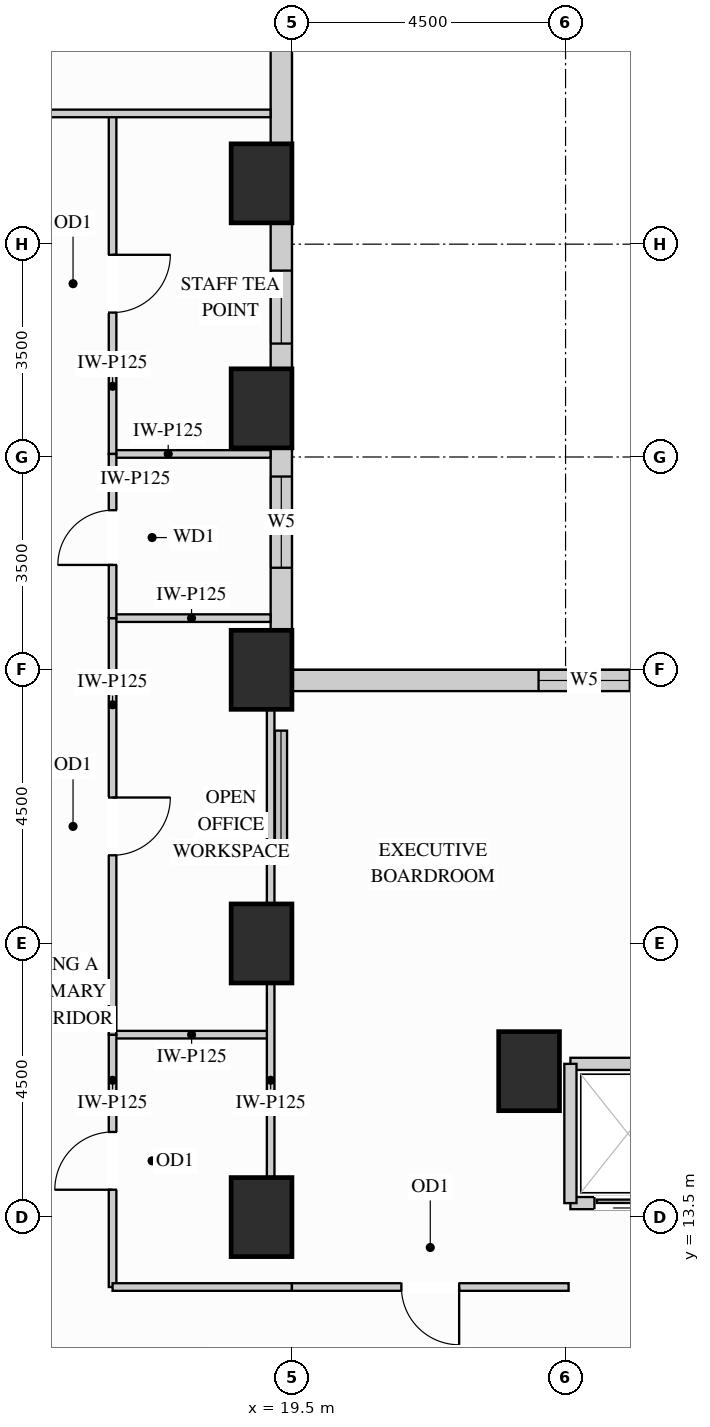
"""IFC4 building model, lengths in metres.
Left out: names, types, materials, properties, quantities, classifications, styles, units other than length and angle.
Written with IfcOpenShell. Run it as: python <this file> out.ifc"""

import sys

from ifc_helpers import new_model, si_unit, direction, frame, frame_2d, origin, origin_2d, place, context, subcontext, project, spatial, rectangle, extrude, source, transform, mapped, element, fill, save


model = new_model("IFC4")
c1 = context("Model", 3, precision=1e-05, world=origin(), true_north=direction((0.0, 1.0)))
c2 = subcontext(c1, "Body", "Model", "MODEL_VIEW")
j1 = project(units=[si_unit("LENGTHUNIT", "METRE"), si_unit("PLANEANGLEUNIT", "RADIAN")], contexts=[c1])
p1 = place(None, origin())
s1 = spatial("IfcSite", under=j1, at=p1, CompositionType="ELEMENT")
p2 = place(p1, origin())
s2 = spatial("IfcBuilding", under=s1, at=p2, CompositionType="ELEMENT")
p3 = place(p2, frame((0.0, 0.0, 65.7)))
s3 = spatial("IfcBuildingStorey", under=s2, at=p3, CompositionType="ELEMENT", Elevation=65.7)
m1 = source(origin(), c2, "Body", "SweptSolid", [
    extrude(rectangle(XDim=1.0, YDim=1.3, at=origin_2d()), origin(), (0.0, 0.0, 1.0), 3.38),
])
for number, where, z_axis, x_axis in (
    (1, (19.0, 13.5, 0.0), (0.0, 0.0, 1.0), (1.0, 0.0, 0.0)),
    (2, (19.0, 18.0, 0.0), (0.0, 0.0, 1.0), (1.0, 0.0, 0.0)),
    (3, (19.0, 22.5, 0.0), (0.0, 0.0, 1.0), (1.0, 0.0, 0.0)),
    (4, (19.0, 26.8, 0.0), (0.0, 0.0, 1.0), (1.0, 0.0, 0.0)),
    (5, (19.0, 30.5, 0.0), (0.0, 0.0, 1.0), (1.0, 0.0, 0.0)),
    (6, (23.4, 15.9, 0.0), (0.0, 0.0, 1.0), (1.0, 0.0, 0.0)),
):
    element("IfcColumn", number, at=place(p3, frame(where, z_axis=z_axis, x_axis=x_axis)), inside=s3, PredefinedType="COLUMN", context=c2, shape_type="MappedRepresentation", body=[
        mapped(m1, transform((0.0, 0.0, 0.0), x_axis=(1.0, 0.0, 0.0), y_axis=(0.0, 1.0, 0.0), z_axis=(0.0, 0.0, 1.0))),
    ])
p4 = place(p3, frame((34.352, 22.325, 0.0), z_axis=(0.0, 0.0, 1.0), x_axis=(-1.0, 0.0, 0.0)))
e7 = element("IfcWall", 7, at=p4, inside=s3, PredefinedType="SOLIDWALL", context=c2, shape_type="SweptSolid", body=[
    extrude(rectangle(XDim=14.854, YDim=0.35, at=frame_2d((7.427, 0.0))), origin(), (0.0, 0.0, 1.0), 3.365),
])
p5 = place(p4, frame((4.058, 0.0, 0.78)))
e8 = element("IfcOpeningElement", 8, at=p5, cuts=e7, PredefinedType="OPENING", context=c2, shape_type="SweptSolid", body=[
    extrude(rectangle(XDim=1.5, YDim=2.0, at=frame_2d((0.75, 1.0))), frame((0.0, 0.185, 0.0), z_axis=(0.0, -1.0, 0.0), x_axis=(1.0, 0.0, 0.0)), (0.0, 0.0, 1.0), 0.37),
])
p6 = place(p4, frame((9.296, 0.0, 0.78)))
e9 = element("IfcOpeningElement", 9, at=p6, cuts=e7, PredefinedType="OPENING", context=c2, shape_type="SweptSolid", body=[
    extrude(rectangle(XDim=1.5, YDim=2.0, at=frame_2d((0.75, 1.0))), frame((0.0, 0.185, 0.0), z_axis=(0.0, -1.0, 0.0), x_axis=(1.0, 0.0, 0.0)), (0.0, 0.0, 1.0), 0.37),
])
p7 = place(p3, frame((19.325, 23.148, 0.0), z_axis=(0.0, 0.0, 1.0), x_axis=(0.0, 1.0, 0.0)))
e10 = element("IfcWall", 10, at=p7, inside=s3, PredefinedType="SOLIDWALL", context=c2, shape_type="SweptSolid", body=[
    extrude(rectangle(XDim=3.004, YDim=0.35, at=frame_2d((1.502, 0.0))), origin(), (0.0, 0.0, 1.0), 2.51),
])
p8 = place(p7, frame((1.031, 0.0, 0.78)))
e11 = element("IfcOpeningElement", 11, at=p8, cuts=e10, PredefinedType="OPENING", context=c2, shape_type="SweptSolid", body=[
    extrude(rectangle(XDim=1.5, YDim=1.55, at=frame_2d((0.75, 0.775))), frame((0.0, 0.185, 0.0), z_axis=(0.0, -1.0, 0.0), x_axis=(1.0, 0.0, 0.0)), (0.0, 0.0, 1.0), 0.37),
])
p9 = place(p3, frame((19.325, 27.448, 0.0), z_axis=(0.0, 0.0, 1.0), x_axis=(0.0, 1.0, 0.0)))
e12 = element("IfcWall", 12, at=p9, inside=s3, PredefinedType="SOLIDWALL", context=c2, shape_type="SweptSolid", body=[
    extrude(rectangle(XDim=2.404, YDim=0.35, at=frame_2d((1.202, 0.0))), origin(), (0.0, 0.0, 1.0), 2.51),
])
p10 = place(p9, frame((0.417, 0.0, 0.78)))
e13 = element("IfcOpeningElement", 13, at=p10, cuts=e12, PredefinedType="OPENING", context=c2, shape_type="SweptSolid", body=[
    extrude(rectangle(XDim=1.2, YDim=1.55, at=frame_2d((0.6, 0.775))), frame((0.0, 0.185, 0.0), z_axis=(0.0, -1.0, 0.0), x_axis=(1.0, 0.0, 0.0)), (0.0, 0.0, 1.0), 0.37),
])
m2 = source(origin(), c2, "Body", "SweptSolid", [
    extrude(rectangle(XDim=3.204, YDim=0.35, at=frame_2d((1.602, 0.0))), origin(), (0.0, 0.0, 1.0), 2.51),
])
p11 = place(p3, frame((19.325, 31.148, 0.0), z_axis=(0.0, 0.0, 1.0), x_axis=(0.0, 1.0, 0.0)))
e14 = element("IfcWall", 14, at=p11, inside=s3, PredefinedType="SOLIDWALL", context=c2, shape_type="MappedRepresentation", body=[
    mapped(m2, transform((0.0, 0.0, 0.0), x_axis=(1.0, 0.0, 0.0), y_axis=(0.0, 1.0, 0.0), z_axis=(0.0, 0.0, 1.0))),
])
m3 = source(origin(), c2, "Body", "SweptSolid", [
    extrude(rectangle(XDim=2.6, YDim=0.125, at=frame_2d((1.3, 0.0))), origin(), (0.0, 0.0, 1.0), 2.896),
])
p12 = place(p3, frame((16.55, 16.5, 0.0), z_axis=(0.0, 0.0, 1.0), x_axis=(1.0, 0.0, 0.0)))
e15 = element("IfcWall", 15, at=p12, inside=s3, PredefinedType="PARTITIONING", context=c2, shape_type="MappedRepresentation", body=[
    mapped(m3, transform((0.0, 0.0, 0.0), x_axis=(1.0, 0.0, 0.0), y_axis=(0.0, 1.0, 0.0), z_axis=(0.0, 0.0, 1.0))),
])
m4 = source(origin(), c2, "Body", "SweptSolid", [
    extrude(rectangle(XDim=2.598, YDim=0.125, at=frame_2d((1.299, 0.0))), origin(), (0.0, 0.0, 1.0), 3.365),
])
for number, where, z_axis, x_axis in (
    (16, (16.55, 23.35, 0.0), (0.0, 0.0, 1.0), (1.0, 0.0, 0.0)),
    (17, (16.55, 26.05, 0.0), (0.0, 0.0, 1.0), (1.0, 0.0, 0.0)),
):
    element("IfcWall", number, at=place(p3, frame(where, z_axis=z_axis, x_axis=x_axis)), inside=s3, PredefinedType="PARTITIONING", context=c2, shape_type="MappedRepresentation", body=[
        mapped(m4, transform((0.0, 0.0, 0.0), x_axis=(1.0, 0.0, 0.0), y_axis=(0.0, 1.0, 0.0), z_axis=(0.0, 0.0, 1.0))),
    ])
m5 = source(origin(), c2, "Body", "SweptSolid", [
    extrude(rectangle(XDim=3.18, YDim=0.125, at=frame_2d((1.59, 0.0))), origin(), (0.0, 0.0, 1.0), 2.67),
])
for number, where, z_axis, x_axis in (
    (18, (19.15, 14.16, 0.0), (0.0, 0.0, 1.0), (0.0, 1.0, 0.0)),
    (19, (19.15, 18.66, 0.0), (0.0, 0.0, 1.0), (0.0, 1.0, 0.0)),
):
    element("IfcWall", number, at=place(p3, frame(where, z_axis=z_axis, x_axis=x_axis)), inside=s3, PredefinedType="PARTITIONING", context=c2, shape_type="MappedRepresentation", body=[
        mapped(m5, transform((0.0, 0.0, 0.0), x_axis=(1.0, 0.0, 0.0), y_axis=(0.0, 1.0, 0.0), z_axis=(0.0, 0.0, 1.0))),
    ])
p13 = place(p3, frame((16.55, 12.35, 0.0), z_axis=(0.0, 0.0, 1.0), x_axis=(0.0, 1.0, 0.0)))
e20 = element("IfcWall", 20, at=p13, inside=s3, PredefinedType="PARTITIONING", context=c2, shape_type="SweptSolid", body=[
    extrude(rectangle(XDim=4.15, YDim=0.125, at=frame_2d((2.075, 0.0))), origin(), (0.0, 0.0, 1.0), 3.365),
])
p14 = place(p13, frame((1.6, 0.0, 0.0)))
e21 = element("IfcOpeningElement", 21, at=p14, cuts=e20, PredefinedType="OPENING", context=c2, shape_type="SweptSolid", body=[
    extrude(rectangle(XDim=0.95, YDim=2.15, at=frame_2d((0.475, 1.075))), frame((0.0, 0.073, 0.0), z_axis=(0.0, -1.0, 0.0), x_axis=(1.0, 0.0, 0.0)), (0.0, 0.0, 1.0), 0.145),
])
p15 = place(p3, frame((16.55, 16.5, 0.0), z_axis=(0.0, 0.0, 1.0), x_axis=(0.0, 1.0, 0.0)))
e22 = element("IfcWall", 22, at=p15, inside=s3, PredefinedType="PARTITIONING", context=c2, shape_type="SweptSolid", body=[
    extrude(rectangle(XDim=6.85, YDim=0.125, at=frame_2d((3.425, 0.0))), origin(), (0.0, 0.0, 1.0), 3.365),
])
p16 = place(p15, frame((2.95, 0.0, 0.0)))
e23 = element("IfcOpeningElement", 23, at=p16, cuts=e22, PredefinedType="OPENING", context=c2, shape_type="SweptSolid", body=[
    extrude(rectangle(XDim=0.95, YDim=2.15, at=frame_2d((0.475, 1.075))), frame((0.0, 0.073, 0.0), z_axis=(0.0, -1.0, 0.0), x_axis=(1.0, 0.0, 0.0)), (0.0, 0.0, 1.0), 0.145),
])
p17 = place(p3, frame((16.55, 26.05, 0.0), z_axis=(0.0, 0.0, 1.0), x_axis=(0.0, 1.0, 0.0)))
e24 = element("IfcWall", 24, at=p17, inside=s3, PredefinedType="PARTITIONING", context=c2, shape_type="SweptSolid", body=[
    extrude(rectangle(XDim=5.6, YDim=0.125, at=frame_2d((2.8, 0.0))), origin(), (0.0, 0.0, 1.0), 3.365),
])
p18 = place(p17, frame((2.325, 0.0, 0.0)))
e25 = element("IfcOpeningElement", 25, at=p18, cuts=e24, PredefinedType="OPENING", context=c2, shape_type="SweptSolid", body=[
    extrude(rectangle(XDim=0.95, YDim=2.15, at=frame_2d((0.475, 1.075))), frame((0.0, 0.073, 0.0), z_axis=(0.0, -1.0, 0.0), x_axis=(1.0, 0.0, 0.0)), (0.0, 0.0, 1.0), 0.145),
])
p19 = place(p3, frame((16.55, 23.35, 0.0), z_axis=(0.0, 0.0, 1.0), x_axis=(0.0, 1.0, 0.0)))
e26 = element("IfcWall", 26, at=p19, inside=s3, PredefinedType="PARTITIONING", context=c2, shape_type="SweptSolid", body=[
    extrude(rectangle(XDim=2.7, YDim=0.125, at=frame_2d((1.35, 0.0))), origin(), (0.0, 0.0, 1.0), 3.365),
])
p20 = place(p19, frame((0.875, 0.0, 0.0)))
e27 = element("IfcOpeningElement", 27, at=p20, cuts=e26, PredefinedType="OPENING", context=c2, shape_type="SweptSolid", body=[
    extrude(rectangle(XDim=0.9, YDim=2.15, at=frame_2d((0.45, 1.075))), frame((0.0, 0.073, 0.0), z_axis=(0.0, -1.0, 0.0), x_axis=(1.0, 0.0, 0.0)), (0.0, 0.0, 1.0), 0.145),
])
m6 = source(origin(), c2, "Body", "SweptSolid", [
    extrude(rectangle(XDim=12.598, YDim=0.125, at=frame_2d((6.299, 0.0))), origin(), (0.0, 0.0, 1.0), 2.828),
])
p21 = place(p3, frame((6.55, 31.65, 0.0), z_axis=(0.0, 0.0, 1.0), x_axis=(1.0, 0.0, 0.0)))
e28 = element("IfcWall", 28, at=p21, inside=s3, PredefinedType="PARTITIONING", context=c2, shape_type="MappedRepresentation", body=[
    mapped(m6, transform((0.0, 0.0, 0.0), x_axis=(1.0, 0.0, 0.0), y_axis=(0.0, 1.0, 0.0), z_axis=(0.0, 0.0, 1.0))),
])
m7 = source(origin(), c2, "Body", "SweptSolid", [
    extrude(rectangle(XDim=2.95, YDim=0.125, at=frame_2d((1.475, 0.0))), origin(), (0.0, 0.0, 1.0), 3.365),
])
p22 = place(p3, frame((16.55, 12.35, 0.0), z_axis=(0.0, 0.0, 1.0), x_axis=(1.0, 0.0, 0.0)))
e29 = element("IfcWall", 29, at=p22, inside=s3, PredefinedType="PARTITIONING", context=c2, shape_type="MappedRepresentation", body=[
    mapped(m7, transform((0.0, 0.0, 0.0), x_axis=(1.0, 0.0, 0.0), y_axis=(0.0, 1.0, 0.0), z_axis=(0.0, 0.0, 1.0))),
])
p23 = place(p3, frame((19.5, 12.35, 0.0), z_axis=(0.0, 0.0, 1.0), x_axis=(1.0, 0.0, 0.0)))
e30 = element("IfcWall", 30, at=p23, inside=s3, PredefinedType="PARTITIONING", context=c2, shape_type="SweptSolid", body=[
    extrude(rectangle(XDim=4.55, YDim=0.125, at=frame_2d((2.275, 0.0))), origin(), (0.0, 0.0, 1.0), 3.365),
])
p24 = place(p23, frame((1.8, 0.0, 0.0)))
e31 = element("IfcOpeningElement", 31, at=p24, cuts=e30, PredefinedType="OPENING", context=c2, shape_type="SweptSolid", body=[
    extrude(rectangle(XDim=0.95, YDim=2.15, at=frame_2d((0.475, 1.075))), frame((0.0, 0.073, 0.0), z_axis=(0.0, -1.0, 0.0), x_axis=(1.0, 0.0, 0.0)), (0.0, 0.0, 1.0), 0.145),
])
m8 = source(origin(), c2, "Body", "SweptSolid", [
    extrude(rectangle(XDim=1.89, YDim=0.2, at=frame_2d((0.945, 0.0))), origin(), (0.0, 0.0, 1.0), 2.67),
])
p25 = place(p3, frame((24.08, 16.02, 0.0), z_axis=(0.0, 0.0, 1.0), x_axis=(1.0, 0.0, 0.0)))
e32 = element("IfcWall", 32, at=p25, inside=s3, PredefinedType="PARTITIONING", context=c2, shape_type="MappedRepresentation", body=[
    mapped(m8, transform((0.0, 0.0, 0.0), x_axis=(1.0, 0.0, 0.0), y_axis=(0.0, 1.0, 0.0), z_axis=(0.0, 0.0, 1.0))),
])
p26 = place(p3, frame((24.08, 13.73, 0.0), z_axis=(0.0, 0.0, 1.0), x_axis=(1.0, 0.0, 0.0)))
e33 = element("IfcWall", 33, at=p26, inside=s3, PredefinedType="PARTITIONING", context=c2, shape_type="SweptSolid", body=[
    extrude(rectangle(XDim=1.89, YDim=0.2, at=frame_2d((0.945, 0.0))), origin(), (0.0, 0.0, 1.0), 2.446),
])
p27 = place(p26, frame((0.395, 0.0, 0.0)))
e34 = element("IfcOpeningElement", 34, at=p27, cuts=e33, PredefinedType="OPENING", context=c2, shape_type="SweptSolid", body=[
    extrude(rectangle(XDim=1.1, YDim=2.2, at=frame_2d((0.55, 1.1))), frame((0.0, 0.11, 0.0), z_axis=(0.0, -1.0, 0.0), x_axis=(1.0, 0.0, 0.0)), (0.0, 0.0, 1.0), 0.22),
])
m9 = source(origin(), c2, "Body", "SweptSolid", [
    extrude(rectangle(XDim=2.29, YDim=0.2, at=frame_2d((1.145, 0.0))), origin(), (0.0, 0.0, 1.0), 3.365),
])
p28 = place(p3, frame((24.08, 13.73, 0.0), z_axis=(0.0, 0.0, 1.0), x_axis=(0.0, 1.0, 0.0)))
e35 = element("IfcWall", 35, at=p28, inside=s3, PredefinedType="PARTITIONING", context=c2, shape_type="MappedRepresentation", body=[
    mapped(m9, transform((0.0, 0.0, 0.0), x_axis=(1.0, 0.0, 0.0), y_axis=(0.0, 1.0, 0.0), z_axis=(0.0, 0.0, 1.0))),
])
m10 = source(origin(), c2, "Body", "SweptSolid", [
    extrude(rectangle(XDim=1.1, YDim=2.2, at=frame_2d((0.55, 1.1))), frame((0.0, 0.025, 0.0), z_axis=(0.0, -1.0, 0.0), x_axis=(1.0, 0.0, 0.0)), (0.0, 0.0, 1.0), 0.05),
])
p29 = place(p27, origin())
e36 = element("IfcDoor", 36, at=p29, inside=s3, OperationType="SLIDING_TO_LEFT", PredefinedType="DOOR", context=c2, shape_type="MappedRepresentation", body=[
    mapped(m10, transform((0.0, 0.0, 0.0), x_axis=(1.0, 0.0, 0.0), y_axis=(0.0, 1.0, 0.0), z_axis=(0.0, 0.0, 1.0))),
])
fill(e34, e36)
m11 = source(origin(), c2, "Body", "SweptSolid", [
    extrude(rectangle(XDim=0.95, YDim=2.15, at=frame_2d((0.475, 1.075))), frame((0.0, 0.025, 0.0), z_axis=(0.0, -1.0, 0.0), x_axis=(1.0, 0.0, 0.0)), (0.0, 0.0, 1.0), 0.05),
])
p30 = place(p14, origin())
e37 = element("IfcDoor", 37, at=p30, inside=s3, OperationType="SINGLE_SWING_LEFT", PredefinedType="DOOR", context=c2, shape_type="MappedRepresentation", body=[
    mapped(m11, transform((0.0, 0.0, 0.0), x_axis=(1.0, 0.0, 0.0), y_axis=(0.0, 1.0, 0.0), z_axis=(0.0, 0.0, 1.0))),
])
fill(e21, e37)
p31 = place(p16, origin())
e38 = element("IfcDoor", 38, at=p31, inside=s3, OperationType="SINGLE_SWING_RIGHT", PredefinedType="DOOR", context=c2, shape_type="MappedRepresentation", body=[
    mapped(m11, transform((0.0, 0.0, 0.0), x_axis=(1.0, 0.0, 0.0), y_axis=(0.0, 1.0, 0.0), z_axis=(0.0, 0.0, 1.0))),
])
fill(e23, e38)
p32 = place(p18, origin())
e39 = element("IfcDoor", 39, at=p32, inside=s3, OperationType="SINGLE_SWING_RIGHT", PredefinedType="DOOR", context=c2, shape_type="MappedRepresentation", body=[
    mapped(m11, transform((0.0, 0.0, 0.0), x_axis=(1.0, 0.0, 0.0), y_axis=(0.0, 1.0, 0.0), z_axis=(0.0, 0.0, 1.0))),
])
fill(e25, e39)
p33 = place(p24, origin())
e40 = element("IfcDoor", 40, at=p33, inside=s3, OperationType="SINGLE_SWING_RIGHT", PredefinedType="DOOR", context=c2, shape_type="MappedRepresentation", body=[
    mapped(m11, transform((0.0, 0.0, 0.0), x_axis=(1.0, 0.0, 0.0), y_axis=(0.0, 1.0, 0.0), z_axis=(0.0, 0.0, 1.0))),
])
fill(e31, e40)
m12 = source(origin(), c2, "Body", "SweptSolid", [
    extrude(rectangle(XDim=0.9, YDim=2.15, at=frame_2d((0.45, 1.075))), frame((0.0, 0.025, 0.0), z_axis=(0.0, -1.0, 0.0), x_axis=(1.0, 0.0, 0.0)), (0.0, 0.0, 1.0), 0.05),
])
p34 = place(p20, origin())
e41 = element("IfcDoor", 41, at=p34, inside=s3, OperationType="SINGLE_SWING_LEFT", PredefinedType="DOOR", context=c2, shape_type="MappedRepresentation", body=[
    mapped(m12, transform((0.0, 0.0, 0.0), x_axis=(1.0, 0.0, 0.0), y_axis=(0.0, 1.0, 0.0), z_axis=(0.0, 0.0, 1.0))),
])
fill(e27, e41)
m13 = source(origin(), c2, "Body", "SweptSolid", [
    extrude(rectangle(XDim=1.2, YDim=1.55, at=frame_2d((0.6, 0.775))), frame((0.0, 0.03, 0.0), z_axis=(0.0, -1.0, 0.0), x_axis=(1.0, 0.0, 0.0)), (0.0, 0.0, 1.0), 0.06),
])
p35 = place(p10, origin())
e42 = element("IfcWindow", 42, at=p35, inside=s3, PartitioningType="SINGLE_PANEL", PredefinedType="WINDOW", context=c2, shape_type="MappedRepresentation", body=[
    mapped(m13, transform((0.0, 0.0, 0.0), x_axis=(1.0, 0.0, 0.0), y_axis=(0.0, 1.0, 0.0), z_axis=(0.0, 0.0, 1.0))),
])
fill(e13, e42)
m14 = source(origin(), c2, "Body", "SweptSolid", [
    extrude(rectangle(XDim=1.5, YDim=2.0, at=frame_2d((0.75, 1.0))), frame((0.0, 0.03, 0.0), z_axis=(0.0, -1.0, 0.0), x_axis=(1.0, 0.0, 0.0)), (0.0, 0.0, 1.0), 0.06),
])
p36 = place(p6, origin())
e43 = element("IfcWindow", 43, at=p36, inside=s3, PartitioningType="SINGLE_PANEL", PredefinedType="WINDOW", context=c2, shape_type="MappedRepresentation", body=[
    mapped(m14, transform((0.0, 0.0, 0.0), x_axis=(1.0, 0.0, 0.0), y_axis=(0.0, 1.0, 0.0), z_axis=(0.0, 0.0, 1.0))),
])
fill(e9, e43)
m15 = source(origin(), c2, "Body", "SweptSolid", [
    extrude(rectangle(XDim=1.5, YDim=1.55, at=frame_2d((0.75, 0.775))), frame((0.0, 0.03, 0.0), z_axis=(0.0, -1.0, 0.0), x_axis=(1.0, 0.0, 0.0)), (0.0, 0.0, 1.0), 0.06),
])
p37 = place(p8, origin())
e44 = element("IfcWindow", 44, at=p37, inside=s3, PartitioningType="SINGLE_PANEL", PredefinedType="WINDOW", context=c2, shape_type="MappedRepresentation", body=[
    mapped(m15, transform((0.0, 0.0, 0.0), x_axis=(1.0, 0.0, 0.0), y_axis=(0.0, 1.0, 0.0), z_axis=(0.0, 0.0, 1.0))),
])
fill(e11, e44)
save(model, sys.argv[1])
